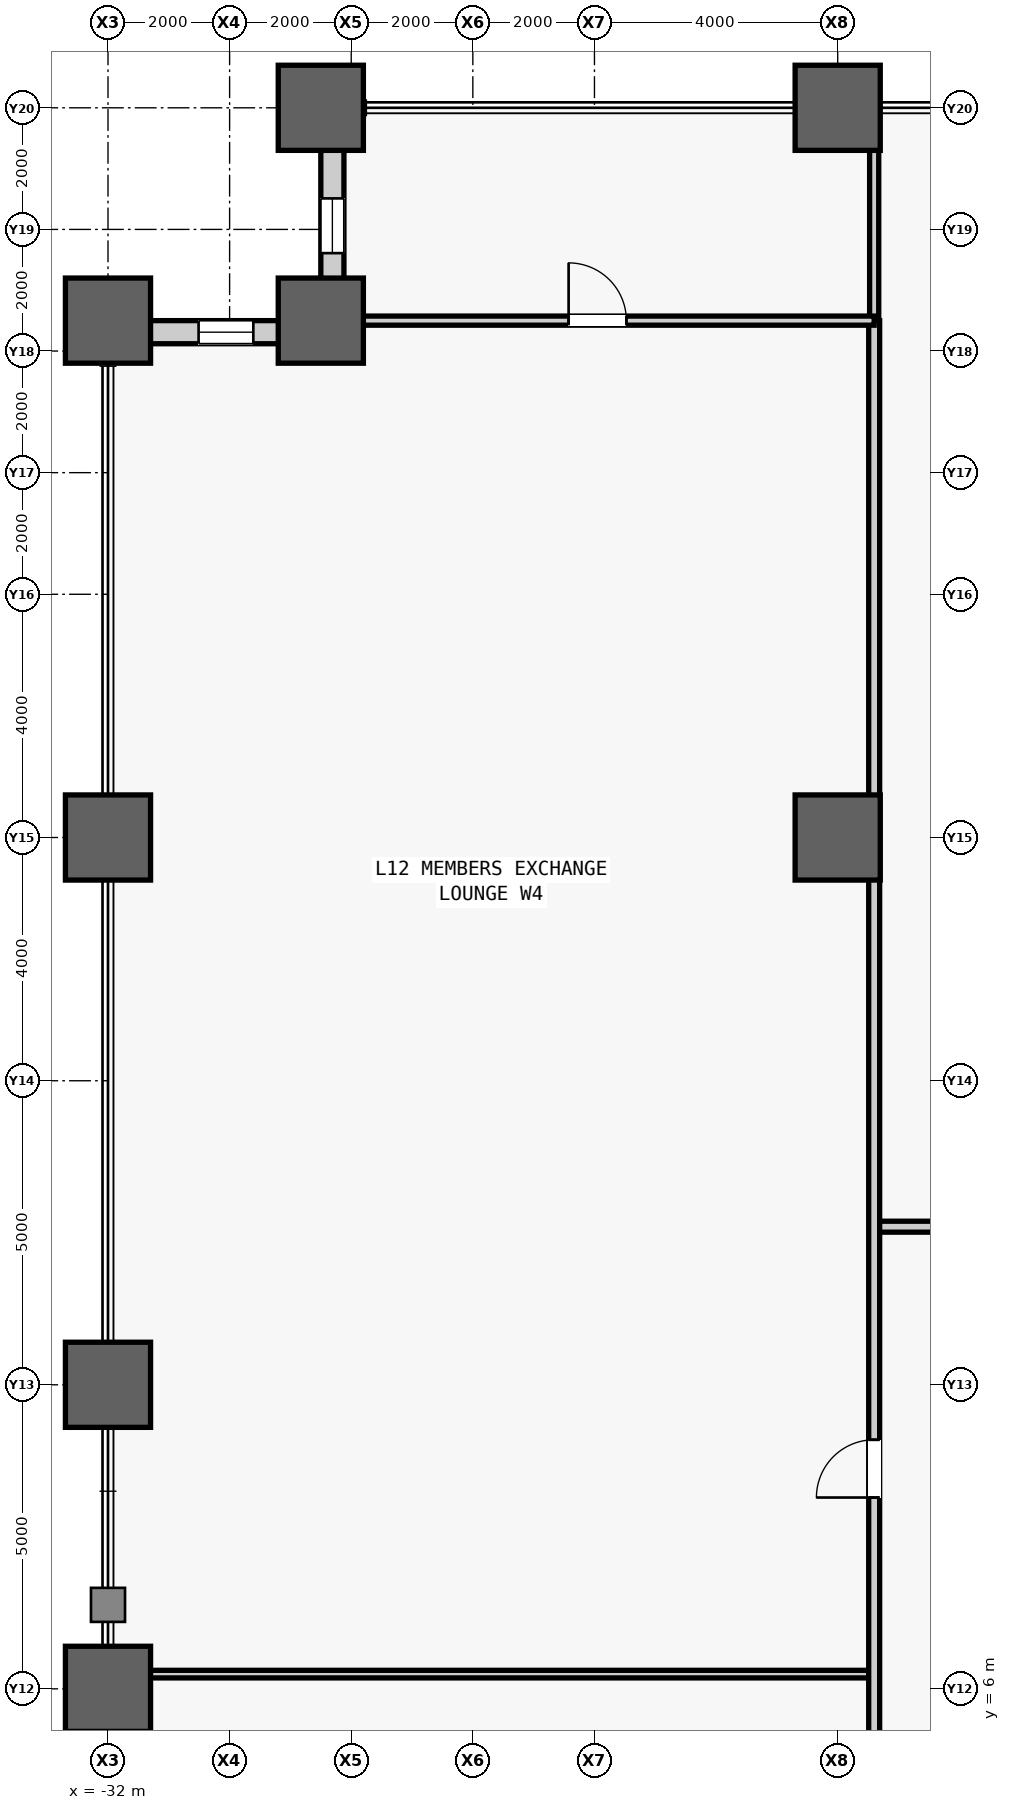
"""IFC4 building model, lengths in metres.
Left out: names, types, materials, properties, quantities, classifications, styles, units other than length and angle.
Written with IfcOpenShell. Run it as: python <this file> out.ifc"""

import sys

from ifc_helpers import new_model, si_unit, direction, frame, frame_2d, origin, origin_2d, place, context, subcontext, project, spatial, rectangle, hollow_rectangle, extrude, source, transform, mapped, element, fill, save


model = new_model("IFC4")
c1 = context("Model", 3, precision=1e-05, world=origin(), true_north=direction((0.0, 1.0)))
c2 = subcontext(c1, "Body", "Model", "MODEL_VIEW")
j1 = project(units=[si_unit("LENGTHUNIT", "METRE"), si_unit("PLANEANGLEUNIT", "RADIAN")], contexts=[c1])
p1 = place(None, origin())
s1 = spatial("IfcSite", under=j1, at=p1, CompositionType="ELEMENT")
p2 = place(p1, origin())
s2 = spatial("IfcBuilding", under=s1, at=p2, CompositionType="ELEMENT")
p3 = place(p2, frame((0.0, 0.0, 57.8)))
s3 = spatial("IfcBuildingStorey", under=s2, at=p3, CompositionType="ELEMENT", Elevation=57.8)
m1 = source(origin(), c2, "Body", "SweptSolid", [
    extrude(hollow_rectangle(XDim=1.4, YDim=1.4, WallThickness=0.075, at=origin_2d()), origin(), (0.0, 0.0, 1.0), 4.2),
])
for number, where, z_axis, x_axis in (
    (1, (-32.0, 6.0, 0.0), (0.0, 0.0, 1.0), (1.0, 0.0, 0.0)),
    (2, (-32.0, 11.0, 0.0), (0.0, 0.0, 1.0), (1.0, 0.0, 0.0)),
    (3, (-32.0, 20.0, 0.0), (0.0, 0.0, 1.0), (1.0, 0.0, 0.0)),
    (4, (-32.0, 28.5, 0.0), (0.0, 0.0, 1.0), (1.0, 0.0, 0.0)),
    (5, (-28.5, 28.5, 0.0), (0.0, 0.0, 1.0), (1.0, 0.0, 0.0)),
    (6, (-28.5, 32.0, 0.0), (0.0, 0.0, 1.0), (1.0, 0.0, 0.0)),
    (7, (-20.0, 20.0, 0.0), (0.0, 0.0, 1.0), (1.0, 0.0, 0.0)),
    (8, (-20.0, 32.0, 0.0), (0.0, 0.0, 1.0), (1.0, 0.0, 0.0)),
):
    element("IfcColumn", number, at=place(p3, frame(where, z_axis=z_axis, x_axis=x_axis)), inside=s3, PredefinedType="COLUMN", context=c2, shape_type="MappedRepresentation", body=[
        mapped(m1, transform((0.0, 0.0, 0.0), scale=1.0)),
    ])
m2 = source(origin(), c2, "Body", "SweptSolid", [
    extrude(rectangle(XDim=3.12, YDim=0.38, at=frame_2d((1.56, 0.0))), origin(), (0.0, 0.0, 1.0), 3.245),
])
p4 = place(p3, frame((-28.31, 28.5, 0.0), z_axis=(0.0, 0.0, 1.0), x_axis=(0.0, 1.0, 0.0)))
e9 = element("IfcWall", 9, at=p4, inside=s3, PredefinedType="STANDARD", context=c2, shape_type="MappedRepresentation", body=[
    mapped(m2, transform((0.0, 0.0, 0.0), scale=1.0)),
])
m3 = source(origin(), c2, "Body", "SweptSolid", [
    extrude(rectangle(XDim=0.9, YDim=2.4, at=frame_2d((0.45, 1.2))), frame((0.0, 0.2, 0.0), z_axis=(0.0, -1.0, 0.0), x_axis=(1.0, 0.0, 0.0)), (0.0, 0.0, 1.0), 0.4),
])
p5 = place(p4, frame((1.11, 0.0, 0.5)))
e10 = element("IfcOpeningElement", 10, at=p5, cuts=e9, PredefinedType="OPENING", context=c2, shape_type="MappedRepresentation", body=[
    mapped(m3, transform((0.0, 0.0, 0.0), scale=1.0)),
])
p6 = place(p3, frame((-28.5, 28.31, 0.0), z_axis=(0.0, 0.0, 1.0), x_axis=(-1.0, 0.0, 0.0)))
e11 = element("IfcWall", 11, at=p6, inside=s3, PredefinedType="STANDARD", context=c2, shape_type="MappedRepresentation", body=[
    mapped(m2, transform((0.0, 0.0, 0.0), scale=1.0)),
])
p7 = place(p6, frame((1.11, 0.0, 0.5)))
e12 = element("IfcOpeningElement", 12, at=p7, cuts=e11, PredefinedType="OPENING", context=c2, shape_type="MappedRepresentation", body=[
    mapped(m3, transform((0.0, 0.0, 0.0), scale=1.0)),
])
m4 = source(origin(), c2, "Body", "SweptSolid", [
    extrude(rectangle(XDim=37.1, YDim=0.18, at=frame_2d((18.55, 0.0))), origin(), (0.0, 0.0, 1.0), 3.94),
])
p8 = place(p3, frame((-19.4, 13.6, 0.0), z_axis=(0.0, 0.0, 1.0), x_axis=(1.0, 0.0, 0.0)))
e13 = element("IfcWall", 13, at=p8, inside=s3, PredefinedType="PARTITIONING", context=c2, shape_type="MappedRepresentation", body=[
    mapped(m4, transform((0.0, 0.0, 0.0), scale=1.0)),
])
m5 = source(origin(), c2, "Body", "SweptSolid", [
    extrude(rectangle(XDim=1.05, YDim=2.2, at=frame_2d((0.525, 1.1))), frame((0.0, 0.1, 0.0), z_axis=(0.0, -1.0, 0.0), x_axis=(1.0, 0.0, 0.0)), (0.0, 0.0, 1.0), 0.2),
])
p9 = place(p8, frame((10.879, 0.0, 0.0)))
e14 = element("IfcOpeningElement", 14, at=p9, cuts=e13, PredefinedType="OPENING", context=c2, shape_type="MappedRepresentation", body=[
    mapped(m5, transform((0.0, 0.0, 0.0), scale=1.0)),
])
p10 = place(p8, frame((25.279, 0.0, 0.0)))
e15 = element("IfcOpeningElement", 15, at=p10, cuts=e13, PredefinedType="OPENING", context=c2, shape_type="MappedRepresentation", body=[
    mapped(m5, transform((0.0, 0.0, 0.0), scale=1.0)),
])
m6 = source(origin(), c2, "Body", "SweptSolid", [
    extrude(rectangle(XDim=3.5, YDim=0.15, at=frame_2d((1.75, 0.0))), origin(), (0.0, 0.0, 1.0), 3.94),
])
p11 = place(p3, frame((-19.4, 28.5, 0.0), z_axis=(0.0, 0.0, 1.0), x_axis=(0.0, 1.0, 0.0)))
e16 = element("IfcWall", 16, at=p11, inside=s3, PredefinedType="PARTITIONING", context=c2, shape_type="MappedRepresentation", body=[
    mapped(m6, transform((0.0, 0.0, 0.0), scale=1.0)),
])
m7 = source(origin(), c2, "Body", "SweptSolid", [
    extrude(rectangle(XDim=12.6, YDim=0.125, at=frame_2d((6.3, 0.0))), origin(), (0.0, 0.0, 1.0), 3.085),
])
p12 = place(p3, frame((-32.0, 6.242, 0.0), z_axis=(0.0, 0.0, 1.0), x_axis=(1.0, 0.0, 0.0)))
e17 = element("IfcWall", 17, at=p12, inside=s3, PredefinedType="PARTITIONING", context=c2, shape_type="MappedRepresentation", body=[
    mapped(m7, transform((0.0, 0.0, 0.0), scale=1.0)),
])
m8 = source(origin(), c2, "Body", "SweptSolid", [
    extrude(rectangle(XDim=57.0, YDim=0.18, at=frame_2d((28.5, 0.0))), origin(), (0.0, 0.0, 1.0), 3.471),
])
p13 = place(p3, frame((-19.4, -28.5, 0.0), z_axis=(0.0, 0.0, 1.0), x_axis=(0.0, 1.0, 0.0)))
e18 = element("IfcWall", 18, at=p13, inside=s3, PredefinedType="PARTITIONING", context=c2, shape_type="MappedRepresentation", body=[
    mapped(m8, transform((0.0, 0.0, 0.0), scale=1.0)),
])
m9 = source(origin(), c2, "Body", "SweptSolid", [
    extrude(rectangle(XDim=0.95, YDim=2.15, at=frame_2d((0.475, 1.075))), frame((0.0, 0.1, 0.0), z_axis=(0.0, -1.0, 0.0), x_axis=(1.0, 0.0, 0.0)), (0.0, 0.0, 1.0), 0.2),
])
p14 = place(p13, frame((16.455, 0.0, 0.0)))
e19 = element("IfcOpeningElement", 19, at=p14, cuts=e18, PredefinedType="OPENING", context=c2, shape_type="MappedRepresentation", body=[
    mapped(m9, transform((0.0, 0.0, 0.0), scale=1.0)),
])
p15 = place(p13, frame((22.664, 0.0, 0.0)))
e20 = element("IfcOpeningElement", 20, at=p15, cuts=e18, PredefinedType="OPENING", context=c2, shape_type="MappedRepresentation", body=[
    mapped(m9, transform((0.0, 0.0, 0.0), scale=1.0)),
])
p16 = place(p13, frame((30.305, 0.0, 0.0)))
e21 = element("IfcOpeningElement", 21, at=p16, cuts=e18, PredefinedType="OPENING", context=c2, shape_type="MappedRepresentation", body=[
    mapped(m9, transform((0.0, 0.0, 0.0), scale=1.0)),
])
p17 = place(p13, frame((37.646, 0.0, 0.0)))
e22 = element("IfcOpeningElement", 22, at=p17, cuts=e18, PredefinedType="OPENING", context=c2, shape_type="MappedRepresentation", body=[
    mapped(m9, transform((0.0, 0.0, 0.0), scale=1.0)),
])
m10 = source(origin(), c2, "Body", "SweptSolid", [
    extrude(rectangle(XDim=9.1, YDim=0.15, at=frame_2d((4.55, 0.0))), origin(), (0.0, 0.0, 1.0), 3.94),
])
p18 = place(p3, frame((-28.5, 28.5, 0.0), z_axis=(0.0, 0.0, 1.0), x_axis=(1.0, 0.0, 0.0)))
e23 = element("IfcWall", 23, at=p18, inside=s3, PredefinedType="PARTITIONING", context=c2, shape_type="MappedRepresentation", body=[
    mapped(m10, transform((0.0, 0.0, 0.0), scale=1.0)),
])
m11 = source(origin(), c2, "Body", "SweptSolid", [
    extrude(rectangle(XDim=0.95, YDim=2.15, at=frame_2d((0.475, 1.075))), frame((0.0, 0.085, 0.0), z_axis=(0.0, -1.0, 0.0), x_axis=(1.0, 0.0, 0.0)), (0.0, 0.0, 1.0), 0.17),
])
p19 = place(p18, frame((4.075, 0.0, 0.0)))
e24 = element("IfcOpeningElement", 24, at=p19, cuts=e23, PredefinedType="OPENING", context=c2, shape_type="MappedRepresentation", body=[
    mapped(m11, transform((0.0, 0.0, 0.0), scale=1.0)),
])
m12 = source(origin(), c2, "Body", "SweptSolid", [
    extrude(rectangle(XDim=0.9, YDim=2.4, at=frame_2d((0.45, 1.2))), frame((0.0, 0.03, 0.0), z_axis=(0.0, -1.0, 0.0), x_axis=(1.0, 0.0, 0.0)), (0.0, 0.0, 1.0), 0.06),
])
p20 = place(p5, origin())
e25 = element("IfcWindow", 25, at=p20, inside=s3, PartitioningType="SINGLE_PANEL", PredefinedType="WINDOW", context=c2, shape_type="MappedRepresentation", body=[
    mapped(m12, transform((0.0, 0.0, 0.0), scale=1.0)),
])
fill(e10, e25)
p21 = place(p7, origin())
e26 = element("IfcWindow", 26, at=p21, inside=s3, PartitioningType="SINGLE_PANEL", PredefinedType="WINDOW", context=c2, shape_type="MappedRepresentation", body=[
    mapped(m12, transform((0.0, 0.0, 0.0), scale=1.0)),
])
fill(e12, e26)
m13 = source(origin(), c2, "Body", "SweptSolid", [
    extrude(rectangle(XDim=0.95, YDim=2.15, at=frame_2d((0.475, 1.075))), frame((0.0, 0.025, 0.0), z_axis=(0.0, -1.0, 0.0), x_axis=(1.0, 0.0, 0.0)), (0.0, 0.0, 1.0), 0.05),
])
p22 = place(p17, origin())
e27 = element("IfcDoor", 27, at=p22, inside=s3, OperationType="SINGLE_SWING_LEFT", PredefinedType="DOOR", context=c2, shape_type="MappedRepresentation", body=[
    mapped(m13, transform((0.0, 0.0, 0.0), scale=1.0)),
])
fill(e22, e27)
p23 = place(p19, origin())
e28 = element("IfcDoor", 28, at=p23, inside=s3, OperationType="SINGLE_SWING_LEFT", PredefinedType="DOOR", context=c2, shape_type="MappedRepresentation", body=[
    mapped(m13, transform((0.0, 0.0, 0.0), scale=1.0)),
])
fill(e24, e28)
save(model, sys.argv[1])
